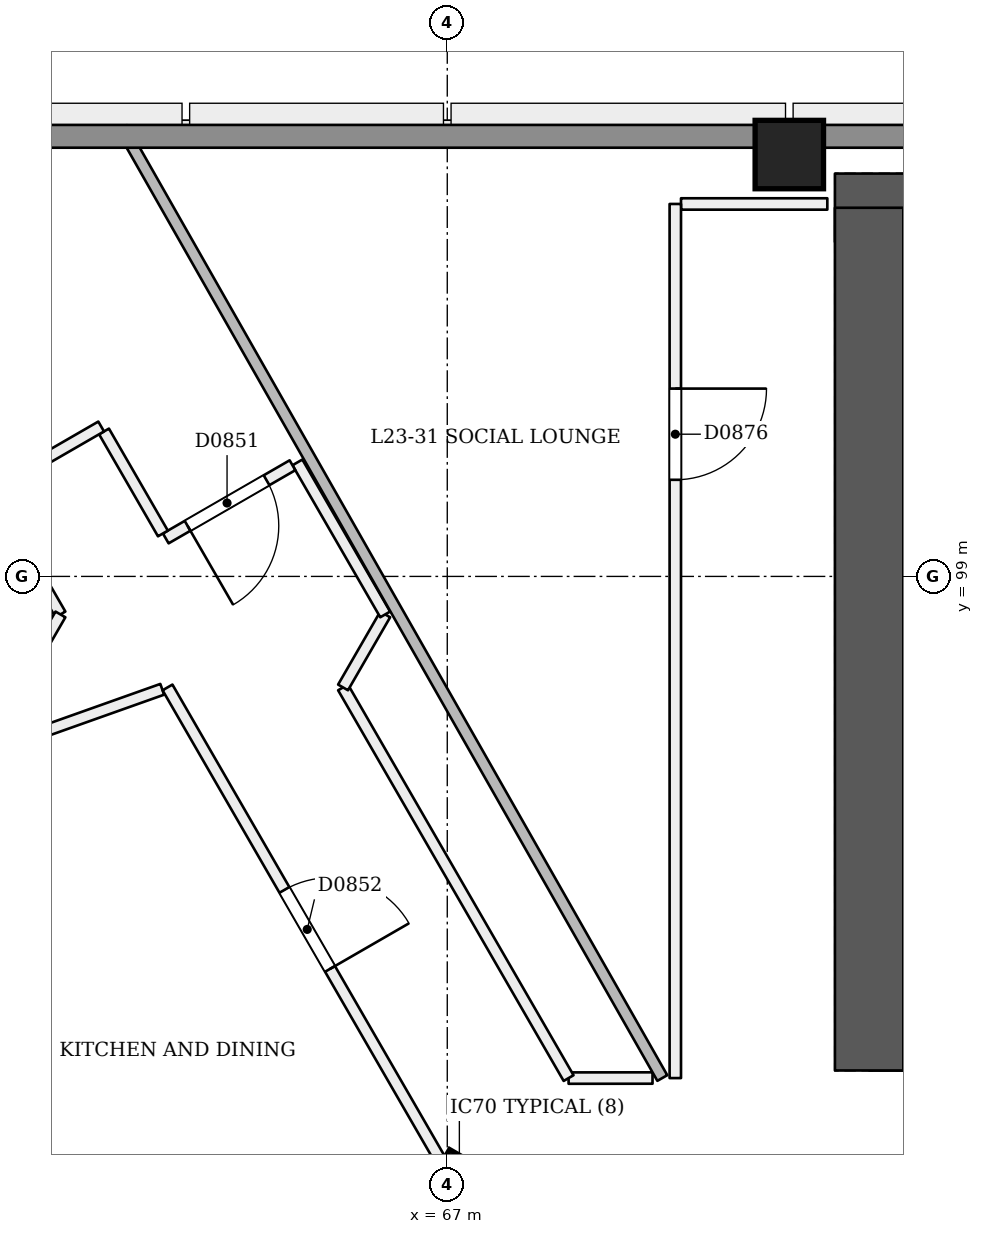
"""IFC4 building model, lengths in metres.
Left out: names, types, materials, properties, quantities, classifications, styles, units other than length and angle.
Written with IfcOpenShell. Run it as: python <this file> out.ifc"""

import sys

from ifc_helpers import new_model, si_unit, direction, frame, frame_2d, origin, origin_2d, place, context, subcontext, project, spatial, rectangle, extrude, element, fill, save


model = new_model("IFC4")
c1 = context("Model", 3, precision=1e-05, world=origin(), true_north=direction((0.0, 1.0)))
c2 = subcontext(c1, "Body", "Model", "MODEL_VIEW")
j1 = project(units=[si_unit("LENGTHUNIT", "METRE"), si_unit("PLANEANGLEUNIT", "RADIAN")], contexts=[c1])
p1 = place(None, origin())
s1 = spatial("IfcSite", under=j1, at=p1, CompositionType="ELEMENT")
p2 = place(p1, origin())
s2 = spatial("IfcBuilding", under=s1, at=p2, CompositionType="ELEMENT")
p3 = place(p2, frame((0.0, 0.0, 91.8)))
s3 = spatial("IfcBuildingStorey", under=s2, at=p3, CompositionType="ELEMENT", Elevation=91.8)
p4 = place(p3, frame((72.55, 92.95, 0.0), z_axis=(0.0, 0.0, 1.0), x_axis=(1.0, 0.0, 0.0)))
e1 = element("IfcWall", 1, at=p4, inside=s3, PredefinedType="SHEAR", context=c2, shape_type="SweptSolid", body=[
    extrude(rectangle(XDim=25.35, YDim=0.9, at=frame_2d((12.675, 0.0))), origin(), (0.0, 0.0, 1.0), 3.6),
])
p5 = place(p4, frame((1.25, 0.0, 0.0)))
e2 = element("IfcOpeningElement", 2, at=p5, cuts=e1, PredefinedType="OPENING", context=c2, shape_type="SweptSolid", body=[
    extrude(rectangle(XDim=1.2, YDim=2.1, at=frame_2d((0.6, 1.05))), frame((0.0, 0.46, 0.0), z_axis=(0.0, -1.0, 0.0), x_axis=(1.0, 0.0, 0.0)), (0.0, 0.0, 1.0), 0.921),
])
p6 = place(p4, frame((3.45, 0.0, 0.0)))
e3 = element("IfcOpeningElement", 3, at=p6, cuts=e1, PredefinedType="OPENING", context=c2, shape_type="SweptSolid", body=[
    extrude(rectangle(XDim=1.2, YDim=2.1, at=frame_2d((0.6, 1.05))), frame((0.0, 0.46, 0.0), z_axis=(0.0, -1.0, 0.0), x_axis=(1.0, 0.0, 0.0)), (0.0, 0.0, 1.0), 0.921),
])
p7 = place(p4, frame((13.45, 0.0, 0.0)))
e4 = element("IfcOpeningElement", 4, at=p7, cuts=e1, PredefinedType="OPENING", context=c2, shape_type="SweptSolid", body=[
    extrude(rectangle(XDim=1.2, YDim=2.1, at=frame_2d((0.6, 1.05))), frame((0.0, 0.46, 0.0), z_axis=(0.0, -1.0, 0.0), x_axis=(1.0, 0.0, 0.0)), (0.0, 0.0, 1.0), 0.921),
])
p8 = place(p4, frame((15.712, 0.0, 0.0)))
e5 = element("IfcOpeningElement", 5, at=p8, cuts=e1, PredefinedType="OPENING", context=c2, shape_type="SweptSolid", body=[
    extrude(rectangle(XDim=1.0, YDim=2.1, at=frame_2d((0.5, 1.05))), frame((0.0, 0.46, 0.0), z_axis=(0.0, -1.0, 0.0), x_axis=(1.0, 0.0, 0.0)), (0.0, 0.0, 1.0), 0.921),
])
p9 = place(p4, frame((18.35, 0.0, 0.0)))
e6 = element("IfcOpeningElement", 6, at=p9, cuts=e1, PredefinedType="OPENING", context=c2, shape_type="SweptSolid", body=[
    extrude(rectangle(XDim=1.0, YDim=2.1, at=frame_2d((0.5, 1.05))), frame((0.0, 0.46, 0.0), z_axis=(0.0, -1.0, 0.0), x_axis=(1.0, 0.0, 0.0)), (0.0, 0.0, 1.0), 0.921),
])
p10 = place(p4, frame((21.938, 0.0, 0.0)))
e7 = element("IfcOpeningElement", 7, at=p10, cuts=e1, PredefinedType="OPENING", context=c2, shape_type="SweptSolid", body=[
    extrude(rectangle(XDim=1.0, YDim=2.1, at=frame_2d((0.5, 1.05))), frame((0.0, 0.46, 0.0), z_axis=(0.0, -1.0, 0.0), x_axis=(1.0, 0.0, 0.0)), (0.0, 0.0, 1.0), 0.921),
])
p11 = place(p3, frame((97.45, 103.85, 0.0), z_axis=(0.0, 0.0, 1.0), x_axis=(-1.0, 0.0, 0.0)))
e8 = element("IfcWall", 8, at=p11, inside=s3, PredefinedType="SHEAR", context=c2, shape_type="SweptSolid", body=[
    extrude(rectangle(XDim=25.35, YDim=0.9, at=frame_2d((12.675, 0.0))), origin(), (0.0, 0.0, 1.0), 3.6),
])
p12 = place(p3, frame((72.55, 103.85, 0.0), z_axis=(0.0, 0.0, 1.0), x_axis=(0.0, -1.0, 0.0)))
e9 = element("IfcWall", 9, at=p12, inside=s3, PredefinedType="SHEAR", context=c2, shape_type="SweptSolid", body=[
    extrude(rectangle(XDim=11.35, YDim=0.9, at=frame_2d((5.675, 0.0))), origin(), (0.0, 0.0, 1.0), 3.6),
])
p13 = place(p3, frame((67.132, 90.934, -0.021), z_axis=(0.022155133694, 0.038483534979, 0.999013597298), x_axis=(-0.864980082328, -0.500330471121, 0.038456167821)))
e10 = element("IfcColumn", 10, at=p13, inside=s3, PredefinedType="COLUMN", context=c2, shape_type="SweptSolid", body=[
    extrude(rectangle(XDim=0.7, YDim=0.7, at=origin_2d()), origin(), (0.0, 0.0, 1.0), 3.604),
])
p14 = place(p3, frame((71.5, 104.55, 0.0), z_axis=(0.0, 0.0, 1.0), x_axis=(1.0, 0.0, 0.0)))
e11 = element("IfcColumn", 11, at=p14, inside=s3, PredefinedType="COLUMN", context=c2, shape_type="SweptSolid", body=[
    extrude(rectangle(XDim=0.9, YDim=0.9, at=origin_2d()), origin(), (0.0, 0.0, 1.0), 3.6),
])
p15 = place(p3, frame((69.7, 92.401, 0.0), z_axis=(0.0, 0.0, 1.0), x_axis=(-0.999999608946, -0.000884368436, 0.0)))
e12 = element("IfcWall", 12, at=p15, inside=s3, PredefinedType="PARTITIONING", context=c2, shape_type="SweptSolid", body=[
    extrude(rectangle(XDim=1.104, YDim=0.15, at=frame_2d((0.552, 0.0))), origin(), (0.0, 0.0, 1.0), 3.3),
])
p16 = place(p3, frame((68.596, 92.4, 0.0), z_axis=(0.0, 0.0, 1.0), x_axis=(-0.500019194352, 0.866014321637, 0.0)))
e13 = element("IfcWall", 13, at=p16, inside=s3, PredefinedType="PARTITIONING", context=c2, shape_type="SweptSolid", body=[
    extrude(rectangle(XDim=5.935, YDim=0.15, at=frame_2d((2.967, 0.0))), origin(), (0.0, 0.0, 1.0), 3.3),
])
p17 = place(p3, frame((65.629, 97.54, 0.0), z_axis=(0.0, 0.0, 1.0), x_axis=(0.50011622646, 0.865958290007, 0.0)))
e14 = element("IfcWall", 14, at=p17, inside=s3, PredefinedType="PARTITIONING", context=c2, shape_type="SweptSolid", body=[
    extrude(rectangle(XDim=1.109, YDim=0.15, at=frame_2d((0.555, 0.0))), origin(), (0.0, 0.0, 1.0), 3.3),
])
p18 = place(p3, frame((66.183, 98.5, 0.0), z_axis=(0.0, 0.0, 1.0), x_axis=(-0.500027479704, 0.866009537788, 0.0)))
e15 = element("IfcWall", 15, at=p18, inside=s3, PredefinedType="PARTITIONING", context=c2, shape_type="SweptSolid", body=[
    extrude(rectangle(XDim=2.309, YDim=0.15, at=frame_2d((1.155, 0.0))), origin(), (0.0, 0.0, 1.0), 3.3),
])
p19 = place(p3, frame((64.964, 100.462, 0.0), z_axis=(0.0, 0.0, 1.0), x_axis=(-0.866033512162, -0.499985955615, 0.0)))
e16 = element("IfcWall", 16, at=p19, inside=s3, PredefinedType="PARTITIONING", context=c2, shape_type="SweptSolid", body=[
    extrude(rectangle(XDim=1.925, YDim=0.15, at=frame_2d((0.962, 0.0))), origin(), (0.0, 0.0, 1.0), 3.3),
])
p20 = place(p19, frame((0.394, 0.0, 0.0)))
e17 = element("IfcOpeningElement", 17, at=p20, cuts=e16, PredefinedType="OPENING", context=c2, shape_type="SweptSolid", body=[
    extrude(rectangle(XDim=1.2, YDim=2.1, at=frame_2d((0.6, 1.05))), frame((0.0, 0.085, 0.0), z_axis=(0.0, -1.0, 0.0), x_axis=(1.0, 0.0, 0.0)), (0.0, 0.0, 1.0), 0.171),
])
p21 = place(p3, frame((63.259, 99.565, 0.0), z_axis=(0.0, 0.0, 1.0), x_axis=(-0.499967891604, 0.866043940782, 0.0)))
e18 = element("IfcWall", 18, at=p21, inside=s3, PredefinedType="PARTITIONING", context=c2, shape_type="SweptSolid", body=[
    extrude(rectangle(XDim=1.55, YDim=0.15, at=frame_2d((0.775, 0.0))), origin(), (0.0, 0.0, 1.0), 3.3),
])
p22 = place(p3, frame((62.447, 100.972, 0.0), z_axis=(0.0, 0.0, 1.0), x_axis=(-0.866015446554, -0.500017246033, 0.0)))
e19 = element("IfcWall", 19, at=p22, inside=s3, PredefinedType="PARTITIONING", context=c2, shape_type="SweptSolid", body=[
    extrude(rectangle(XDim=1.625, YDim=0.15, at=frame_2d((0.812, 0.0))), origin(), (0.0, 0.0, 1.0), 3.3),
])
p23 = place(p3, frame((60.974, 100.122, 0.0), z_axis=(0.0, 0.0, 1.0), x_axis=(0.499951854219, -0.86605319898, 0.0)))
e20 = element("IfcWall", 20, at=p23, inside=s3, PredefinedType="PARTITIONING", context=c2, shape_type="SweptSolid", body=[
    extrude(rectangle(XDim=1.873, YDim=0.15, at=frame_2d((0.937, 0.0))), origin(), (0.0, 0.0, 1.0), 3.3),
])
p24 = place(p3, frame((61.911, 98.5, 0.0), z_axis=(0.0, 0.0, 1.0), x_axis=(-0.499951133605, -0.866053614973, 0.0)))
e21 = element("IfcWall", 21, at=p24, inside=s3, PredefinedType="PARTITIONING", context=c2, shape_type="SweptSolid", body=[
    extrude(rectangle(XDim=1.109, YDim=0.15, at=frame_2d((0.554, 0.0))), origin(), (0.0, 0.0, 1.0), 3.3),
])
p25 = place(p3, frame((61.69, 96.961, 0.0), z_axis=(0.0, 0.0, 1.0), x_axis=(0.942304690634, 0.334756433858, 0.0)))
e22 = element("IfcWall", 22, at=p25, inside=s3, PredefinedType="PARTITIONING", context=c2, shape_type="SweptSolid", body=[
    extrude(rectangle(XDim=1.655, YDim=0.15, at=frame_2d((0.827, 0.0))), origin(), (0.0, 0.0, 1.0), 3.3),
])
p26 = place(p3, frame((63.319, 97.54, 0.0), z_axis=(0.0, 0.0, 1.0), x_axis=(0.500001382442, -0.86602460563, 0.0)))
e23 = element("IfcWall", 23, at=p26, inside=s3, PredefinedType="PARTITIONING", context=c2, shape_type="SweptSolid", body=[
    extrude(rectangle(XDim=42.252, YDim=0.15, at=frame_2d((21.126, 0.0))), origin(), (0.0, 0.0, 1.0), 2.9),
])
p27 = place(p26, frame((3.076, 0.0, 0.0)))
e24 = element("IfcOpeningElement", 24, at=p27, cuts=e23, PredefinedType="OPENING", context=c2, shape_type="SweptSolid", body=[
    extrude(rectangle(XDim=1.2, YDim=2.1, at=frame_2d((0.6, 1.05))), frame((0.0, 0.085, 0.0), z_axis=(0.0, -1.0, 0.0), x_axis=(1.0, 0.0, 0.0)), (0.0, 0.0, 1.0), 0.171),
])
p28 = place(p26, frame((10.455, 0.0, 0.0)))
e25 = element("IfcOpeningElement", 25, at=p28, cuts=e23, PredefinedType="OPENING", context=c2, shape_type="SweptSolid", body=[
    extrude(rectangle(XDim=1.1, YDim=2.1, at=frame_2d((0.55, 1.05))), frame((0.0, 0.085, 0.0), z_axis=(0.0, -1.0, 0.0), x_axis=(1.0, 0.0, 0.0)), (0.0, 0.0, 1.0), 0.171),
])
p29 = place(p26, frame((13.876, 0.0, 0.0)))
e26 = element("IfcOpeningElement", 26, at=p29, cuts=e23, PredefinedType="OPENING", context=c2, shape_type="SweptSolid", body=[
    extrude(rectangle(XDim=1.0, YDim=2.1, at=frame_2d((0.5, 1.05))), frame((0.0, 0.085, 0.0), z_axis=(0.0, -1.0, 0.0), x_axis=(1.0, 0.0, 0.0)), (0.0, 0.0, 1.0), 0.171),
])
p30 = place(p26, frame((18.376, 0.0, 0.0)))
e27 = element("IfcOpeningElement", 27, at=p30, cuts=e23, PredefinedType="OPENING", context=c2, shape_type="SweptSolid", body=[
    extrude(rectangle(XDim=1.0, YDim=2.1, at=frame_2d((0.5, 1.05))), frame((0.0, 0.085, 0.0), z_axis=(0.0, -1.0, 0.0), x_axis=(1.0, 0.0, 0.0)), (0.0, 0.0, 1.0), 0.171),
])
p31 = place(p26, frame((21.731, 0.0, 0.0)))
e28 = element("IfcOpeningElement", 28, at=p31, cuts=e23, PredefinedType="OPENING", context=c2, shape_type="SweptSolid", body=[
    extrude(rectangle(XDim=1.0, YDim=2.1, at=frame_2d((0.5, 1.05))), frame((0.0, 0.085, 0.0), z_axis=(0.0, -1.0, 0.0), x_axis=(1.0, 0.0, 0.0)), (0.0, 0.0, 1.0), 0.171),
])
p32 = place(p26, frame((28.406, 0.0, 0.0)))
e29 = element("IfcOpeningElement", 29, at=p32, cuts=e23, PredefinedType="OPENING", context=c2, shape_type="SweptSolid", body=[
    extrude(rectangle(XDim=1.0, YDim=2.1, at=frame_2d((0.5, 1.05))), frame((0.0, 0.085, 0.0), z_axis=(0.0, -1.0, 0.0), x_axis=(1.0, 0.0, 0.0)), (0.0, 0.0, 1.0), 0.171),
])
p33 = place(p26, frame((30.847, 0.0, 0.0)))
e30 = element("IfcOpeningElement", 30, at=p33, cuts=e23, PredefinedType="OPENING", context=c2, shape_type="SweptSolid", body=[
    extrude(rectangle(XDim=1.0, YDim=2.1, at=frame_2d((0.5, 1.05))), frame((0.0, 0.085, 0.0), z_axis=(0.0, -1.0, 0.0), x_axis=(1.0, 0.0, 0.0)), (0.0, 0.0, 1.0), 0.171),
])
p34 = place(p26, frame((37.989, 0.0, 0.0)))
e31 = element("IfcOpeningElement", 31, at=p34, cuts=e23, PredefinedType="OPENING", context=c2, shape_type="SweptSolid", body=[
    extrude(rectangle(XDim=1.2, YDim=2.1, at=frame_2d((0.6, 1.05))), frame((0.0, 0.085, 0.0), z_axis=(0.0, -1.0, 0.0), x_axis=(1.0, 0.0, 0.0)), (0.0, 0.0, 1.0), 0.171),
])
p35 = place(p3, frame((72.0, 103.9, 0.0), z_axis=(0.0, 0.0, 1.0), x_axis=(-1.0, 0.0, 0.0)))
e32 = element("IfcWall", 32, at=p35, inside=s3, PredefinedType="PARTITIONING", context=c2, shape_type="SweptSolid", body=[
    extrude(rectangle(XDim=1.925, YDim=0.15, at=frame_2d((0.962, 0.0))), origin(), (0.0, 0.0, 1.0), 3.3),
])
p36 = place(p3, frame((70.0, 103.9, 0.0), z_axis=(0.0, 0.0, 1.0), x_axis=(0.0, -1.0, 0.0)))
e33 = element("IfcWall", 33, at=p36, inside=s3, PredefinedType="PARTITIONING", context=c2, shape_type="SweptSolid", body=[
    extrude(rectangle(XDim=11.5, YDim=0.15, at=frame_2d((5.75, 0.0))), origin(), (0.0, 0.0, 1.0), 3.3),
])
p37 = place(p36, frame((2.429, 0.0, 0.0)))
e34 = element("IfcOpeningElement", 34, at=p37, cuts=e33, PredefinedType="OPENING", context=c2, shape_type="SweptSolid", body=[
    extrude(rectangle(XDim=1.2, YDim=2.1, at=frame_2d((0.6, 1.05))), frame((0.0, 0.085, 0.0), z_axis=(0.0, -1.0, 0.0), x_axis=(1.0, 0.0, 0.0)), (0.0, 0.0, 1.0), 0.171),
])
p38 = place(p3, frame((69.829, 92.401, 0.0), z_axis=(0.0, 0.0, 1.0), x_axis=(-0.494399076239, 0.869235039223, 0.0)))
e35 = element("IfcWall", 35, at=p38, inside=s3, PredefinedType="PARTITIONING", context=c2, shape_type="SweptSolid", body=[
    extrude(rectangle(XDim=14.379, YDim=0.15, at=frame_2d((7.19, 0.0))), origin(), (0.0, 0.0, 1.0), 3.3),
])
p39 = place(p3, frame((60.121, 104.79, 0.0), z_axis=(0.0, 0.0, 1.0), x_axis=(1.0, 0.0, 0.0)))
e36 = element("IfcWall", 36, at=p39, inside=s3, PredefinedType="SOLIDWALL", context=c2, shape_type="SweptSolid", body=[
    extrude(rectangle(XDim=49.758, YDim=0.3, at=frame_2d((24.879, 0.0))), origin(), (0.0, 0.0, 1.0), 3.3),
])
p40 = place(p20, origin())
e37 = element("IfcDoor", 37, at=p40, inside=s3, OperationType="SINGLE_SWING_RIGHT", PredefinedType="NOTDEFINED", context=c2, shape_type="SweptSolid", body=[
    extrude(rectangle(XDim=1.2, YDim=2.1, at=frame_2d((0.6, 1.05))), frame((0.0, 0.025, 0.0), z_axis=(0.0, -1.0, 0.0), x_axis=(1.0, 0.0, 0.0)), (0.0, 0.0, 1.0), 0.05),
])
fill(e17, e37)
p41 = place(p27, origin())
e38 = element("IfcDoor", 38, at=p41, inside=s3, OperationType="SINGLE_SWING_RIGHT", PredefinedType="NOTDEFINED", context=c2, shape_type="SweptSolid", body=[
    extrude(rectangle(XDim=1.2, YDim=2.1, at=frame_2d((0.6, 1.05))), frame((0.0, 0.025, 0.0), z_axis=(0.0, -1.0, 0.0), x_axis=(1.0, 0.0, 0.0)), (0.0, 0.0, 1.0), 0.05),
])
fill(e24, e38)
p42 = place(p37, origin())
e39 = element("IfcDoor", 39, at=p42, inside=s3, OperationType="SINGLE_SWING_LEFT", PredefinedType="NOTDEFINED", context=c2, shape_type="SweptSolid", body=[
    extrude(rectangle(XDim=1.2, YDim=2.1, at=frame_2d((0.6, 1.05))), frame((0.0, 0.025, 0.0), z_axis=(0.0, -1.0, 0.0), x_axis=(1.0, 0.0, 0.0)), (0.0, 0.0, 1.0), 0.05),
])
fill(e34, e39)
save(model, sys.argv[1])
